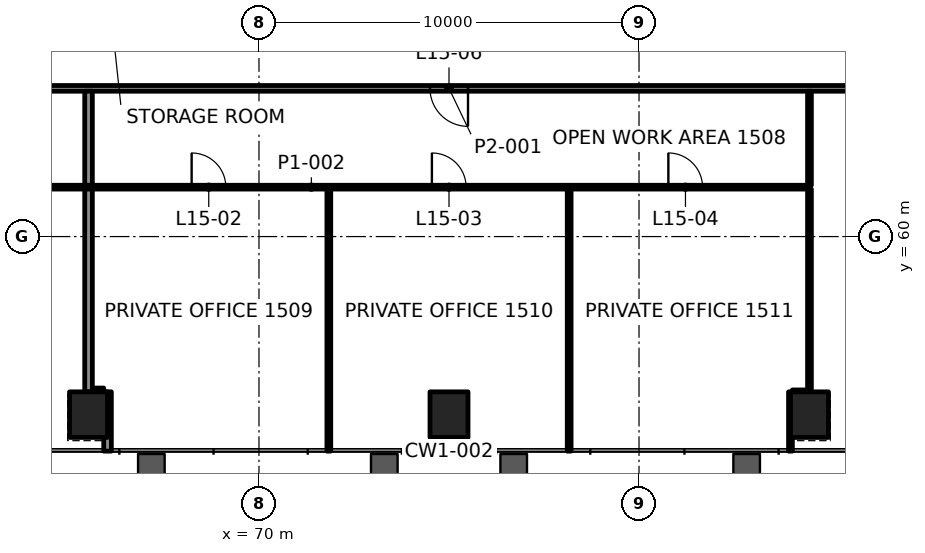
"""IFC4 building model, lengths in metres.
Left out: names, types, materials, properties, quantities, classifications, styles, units other than length and angle.
Written with IfcOpenShell. Run it as: python <this file> out.ifc"""

import sys

from ifc_helpers import new_model, si_unit, direction, frame, frame_2d, origin, origin_2d, place, context, subcontext, project, spatial, rectangle, extrude, element, fill, save


model = new_model("IFC4")
c1 = context("Model", 3, precision=1e-05, world=origin(), true_north=direction((0.0, 1.0)))
c2 = subcontext(c1, "Body", "Model", "MODEL_VIEW")
j1 = project(units=[si_unit("LENGTHUNIT", "METRE"), si_unit("PLANEANGLEUNIT", "RADIAN")], contexts=[c1])
p1 = place(None, origin())
s1 = spatial("IfcSite", under=j1, at=p1, CompositionType="ELEMENT")
p2 = place(p1, origin())
s2 = spatial("IfcBuilding", under=s1, at=p2, CompositionType="ELEMENT")
p3 = place(p2, frame((0.0, 0.0, 69.4)))
s3 = spatial("IfcBuildingStorey", under=s2, at=p3, CompositionType="ELEMENT", Elevation=69.4)
for number, where, z_axis, x_axis in (
    (1, (65.515, 55.314, -0.0), (0.0, 0.0, 1.0), (1.0, 0.0, 0.0)),
    (2, (75.0, 55.314, -0.0), (0.0, 0.0, 1.0), (1.0, 0.0, 0.0)),
    (3, (84.485, 55.314, -0.0), (0.0, 0.0, 1.0), (1.0, 0.0, 0.0)),
):
    element("IfcColumn", number, at=place(p3, frame(where, z_axis=z_axis, x_axis=x_axis)), inside=s3, PredefinedType="COLUMN", context=c2, shape_type="SweptSolid", body=[
        extrude(rectangle(XDim=1.0, YDim=1.2, at=origin_2d()), origin(), (0.0, 0.0, 1.0), 4.2),
    ])
p4 = place(p3, frame((65.625, 55.914, 0.0), z_axis=(0.0, 0.0, 1.0), x_axis=(1.0, 0.0, 0.0)))
e4 = element("IfcWall", 4, at=p4, inside=s3, PredefinedType="PARTITIONING", context=c2, shape_type="SweptSolid", body=[
    extrude(rectangle(XDim=0.29, YDim=0.2, at=frame_2d((0.145, 0.0))), origin(), (0.0, 0.0, 1.0), 3.4),
])
p5 = place(p3, frame((84.036, 55.914, 0.0), z_axis=(0.0, 0.0, 1.0), x_axis=(1.0, 0.0, 0.0)))
e5 = element("IfcWall", 5, at=p5, inside=s3, PredefinedType="PARTITIONING", context=c2, shape_type="SweptSolid", body=[
    extrude(rectangle(XDim=0.399, YDim=0.1, at=frame_2d((0.199, 0.0))), origin(), (0.0, 0.0, 1.0), 3.4),
])
p6 = place(p3, frame((58.271, 61.3, 0.0), z_axis=(0.0, 0.0, 1.0), x_axis=(1.0, 0.0, 0.0)))
e6 = element("IfcWall", 6, at=p6, inside=s3, PredefinedType="PARTITIONING", context=c2, shape_type="SweptSolid", body=[
    extrude(rectangle(XDim=26.214, YDim=0.1, at=frame_2d((13.107, 0.0))), origin(), (0.0, 0.0, 1.0), 3.4),
])
p7 = place(p6, frame((3.122, 0.0, 0.0)))
e7 = element("IfcOpeningElement", 7, at=p7, cuts=e6, PredefinedType="OPENING", context=c2, shape_type="SweptSolid", body=[
    extrude(rectangle(XDim=1.2, YDim=2.1, at=frame_2d((0.6, 1.05))), frame((0.0, 0.06, 0.0), z_axis=(0.0, -1.0, 0.0), x_axis=(1.0, 0.0, 0.0)), (0.0, 0.0, 1.0), 0.12),
])
p8 = place(p6, frame((9.957, 0.0, 0.0)))
e8 = element("IfcOpeningElement", 8, at=p8, cuts=e6, PredefinedType="OPENING", context=c2, shape_type="SweptSolid", body=[
    extrude(rectangle(XDim=0.9, YDim=2.1, at=frame_2d((0.45, 1.05))), frame((0.0, 0.06, 0.0), z_axis=(0.0, -1.0, 0.0), x_axis=(1.0, 0.0, 0.0)), (0.0, 0.0, 1.0), 0.12),
])
p9 = place(p6, frame((16.279, 0.0, 0.0)))
e9 = element("IfcOpeningElement", 9, at=p9, cuts=e6, PredefinedType="OPENING", context=c2, shape_type="SweptSolid", body=[
    extrude(rectangle(XDim=0.9, YDim=2.1, at=frame_2d((0.45, 1.05))), frame((0.0, 0.06, 0.0), z_axis=(0.0, -1.0, 0.0), x_axis=(1.0, 0.0, 0.0)), (0.0, 0.0, 1.0), 0.12),
])
p10 = place(p6, frame((22.501, 0.0, 0.0)))
e10 = element("IfcOpeningElement", 10, at=p10, cuts=e6, PredefinedType="OPENING", context=c2, shape_type="SweptSolid", body=[
    extrude(rectangle(XDim=0.9, YDim=2.1, at=frame_2d((0.45, 1.05))), frame((0.0, 0.06, 0.0), z_axis=(0.0, -1.0, 0.0), x_axis=(1.0, 0.0, 0.0)), (0.0, 0.0, 1.0), 0.12),
])
p11 = place(p3, frame((90.099, 63.9, 0.0), z_axis=(0.0, 0.0, 1.0), x_axis=(-1.0, 0.0, 0.0)))
e11 = element("IfcWall", 11, at=p11, inside=s3, PredefinedType="PARTITIONING", context=c2, shape_type="SweptSolid", body=[
    extrude(rectangle(XDim=30.199, YDim=0.15, at=frame_2d((15.1, 0.0))), origin(), (0.0, 0.0, 1.0), 3.4),
])
p12 = place(p11, frame((2.309, 0.0, 0.0)))
e12 = element("IfcOpeningElement", 12, at=p12, cuts=e11, PredefinedType="OPENING", context=c2, shape_type="SweptSolid", body=[
    extrude(rectangle(XDim=1.2, YDim=2.1, at=frame_2d((0.6, 1.05))), frame((0.0, 0.085, 0.0), z_axis=(0.0, -1.0, 0.0), x_axis=(1.0, 0.0, 0.0)), (0.0, 0.0, 1.0), 0.17),
])
p13 = place(p11, frame((14.599, 0.0, 0.0)))
e13 = element("IfcOpeningElement", 13, at=p13, cuts=e11, PredefinedType="OPENING", context=c2, shape_type="SweptSolid", body=[
    extrude(rectangle(XDim=1.0, YDim=2.1, at=frame_2d((0.5, 1.05))), frame((0.0, 0.085, 0.0), z_axis=(0.0, -1.0, 0.0), x_axis=(1.0, 0.0, 0.0)), (0.0, 0.0, 1.0), 0.17),
])
p14 = place(p11, frame((26.791, 0.0, 0.0)))
e14 = element("IfcOpeningElement", 14, at=p14, cuts=e11, PredefinedType="OPENING", context=c2, shape_type="SweptSolid", body=[
    extrude(rectangle(XDim=1.0, YDim=2.1, at=frame_2d((0.5, 1.05))), frame((0.0, 0.085, 0.0), z_axis=(0.0, -1.0, 0.0), x_axis=(1.0, 0.0, 0.0)), (0.0, 0.0, 1.0), 0.17),
])
p15 = place(p3, frame((84.485, 55.915, 0.0), z_axis=(0.0, 0.0, 1.0), x_axis=(0.0, 1.0, 0.0)))
e15 = element("IfcWall", 15, at=p15, inside=s3, PredefinedType="PARTITIONING", context=c2, shape_type="SweptSolid", body=[
    extrude(rectangle(XDim=5.335, YDim=0.1, at=frame_2d((2.668, 0.0))), origin(), (0.0, 0.0, 1.0), 3.4),
])
p16 = place(p3, frame((83.985, 54.354, 0.0), z_axis=(0.0, 0.0, 1.0), x_axis=(0.0, 1.0, 0.0)))
e16 = element("IfcWall", 16, at=p16, inside=s3, PredefinedType="PARTITIONING", context=c2, shape_type="SweptSolid", body=[
    extrude(rectangle(XDim=1.56, YDim=0.1, at=frame_2d((0.78, 0.0))), origin(), (0.0, 0.0, 1.0), 3.165),
])
for number, where, z_axis, x_axis in (
    (17, (78.162, 54.354, 0.0), (0.0, 0.0, 1.0), (0.0, 1.0, 0.0)),
    (18, (71.838, 54.354, 0.0), (0.0, 0.0, 1.0), (0.0, 1.0, 0.0)),
):
    element("IfcWall", number, at=place(p3, frame(where, z_axis=z_axis, x_axis=x_axis)), inside=s3, PredefinedType="PARTITIONING", context=c2, shape_type="SweptSolid", body=[
        extrude(rectangle(XDim=6.896, YDim=0.1, at=frame_2d((3.448, 0.0))), origin(), (0.0, 0.0, 1.0), 3.165),
    ])
p17 = place(p3, frame((66.015, 54.354, 0.0), z_axis=(0.0, 0.0, 1.0), x_axis=(0.0, 1.0, 0.0)))
e19 = element("IfcWall", 19, at=p17, inside=s3, PredefinedType="PARTITIONING", context=c2, shape_type="SweptSolid", body=[
    extrude(rectangle(XDim=1.56, YDim=0.2, at=frame_2d((0.78, 0.0))), origin(), (0.0, 0.0, 1.0), 3.165),
])
p18 = place(p3, frame((65.515, 55.914, 0.0), z_axis=(0.0, 0.0, 1.0), x_axis=(0.0, 1.0, 0.0)))
e20 = element("IfcWall", 20, at=p18, inside=s3, PredefinedType="PARTITIONING", context=c2, shape_type="SweptSolid", body=[
    extrude(rectangle(XDim=5.336, YDim=0.2, at=frame_2d((2.668, 0.0))), origin(), (0.0, 0.0, 1.0), 3.4),
])
p19 = place(p3, frame((84.485, 61.35, 0.0), z_axis=(0.0, 0.0, 1.0), x_axis=(0.0, 1.0, 0.0)))
e21 = element("IfcWall", 21, at=p19, inside=s3, PredefinedType="PARTITIONING", context=c2, shape_type="SweptSolid", body=[
    extrude(rectangle(XDim=2.475, YDim=0.1, at=frame_2d((1.237, 0.0))), origin(), (0.0, 0.0, 1.0), 3.4),
])
p20 = place(p3, frame((65.515, 61.35, 0.0), z_axis=(0.0, 0.0, 1.0), x_axis=(0.0, 1.0, 0.0)))
e22 = element("IfcWall", 22, at=p20, inside=s3, PredefinedType="PARTITIONING", context=c2, shape_type="SweptSolid", body=[
    extrude(rectangle(XDim=2.475, YDim=0.2, at=frame_2d((1.237, 0.0))), origin(), (0.0, 0.0, 1.0), 3.4),
])
p21 = place(p8, origin())
e23 = element("IfcDoor", 23, at=p21, inside=s3, OperationType="SINGLE_SWING_RIGHT", PredefinedType="DOOR", context=c2, shape_type="SweptSolid", body=[
    extrude(rectangle(XDim=0.9, YDim=2.1, at=frame_2d((0.45, 1.05))), frame((0.0, 0.025, 0.0), z_axis=(0.0, -1.0, 0.0), x_axis=(1.0, 0.0, 0.0)), (0.0, 0.0, 1.0), 0.05),
])
fill(e8, e23)
p22 = place(p9, origin())
e24 = element("IfcDoor", 24, at=p22, inside=s3, OperationType="SINGLE_SWING_LEFT", PredefinedType="DOOR", context=c2, shape_type="SweptSolid", body=[
    extrude(rectangle(XDim=0.9, YDim=2.1, at=frame_2d((0.45, 1.05))), frame((0.0, 0.025, 0.0), z_axis=(0.0, -1.0, 0.0), x_axis=(1.0, 0.0, 0.0)), (0.0, 0.0, 1.0), 0.05),
])
fill(e9, e24)
p23 = place(p10, origin())
e25 = element("IfcDoor", 25, at=p23, inside=s3, OperationType="SINGLE_SWING_RIGHT", PredefinedType="DOOR", context=c2, shape_type="SweptSolid", body=[
    extrude(rectangle(XDim=0.9, YDim=2.1, at=frame_2d((0.45, 1.05))), frame((0.0, 0.025, 0.0), z_axis=(0.0, -1.0, 0.0), x_axis=(1.0, 0.0, 0.0)), (0.0, 0.0, 1.0), 0.05),
])
fill(e10, e25)
p24 = place(p13, origin())
e26 = element("IfcDoor", 26, at=p24, inside=s3, OperationType="SINGLE_SWING_RIGHT", PredefinedType="DOOR", context=c2, shape_type="SweptSolid", body=[
    extrude(rectangle(XDim=1.0, YDim=2.1, at=frame_2d((0.5, 1.05))), frame((0.0, 0.025, 0.0), z_axis=(0.0, -1.0, 0.0), x_axis=(1.0, 0.0, 0.0)), (0.0, 0.0, 1.0), 0.05),
])
fill(e13, e26)
save(model, sys.argv[1])
